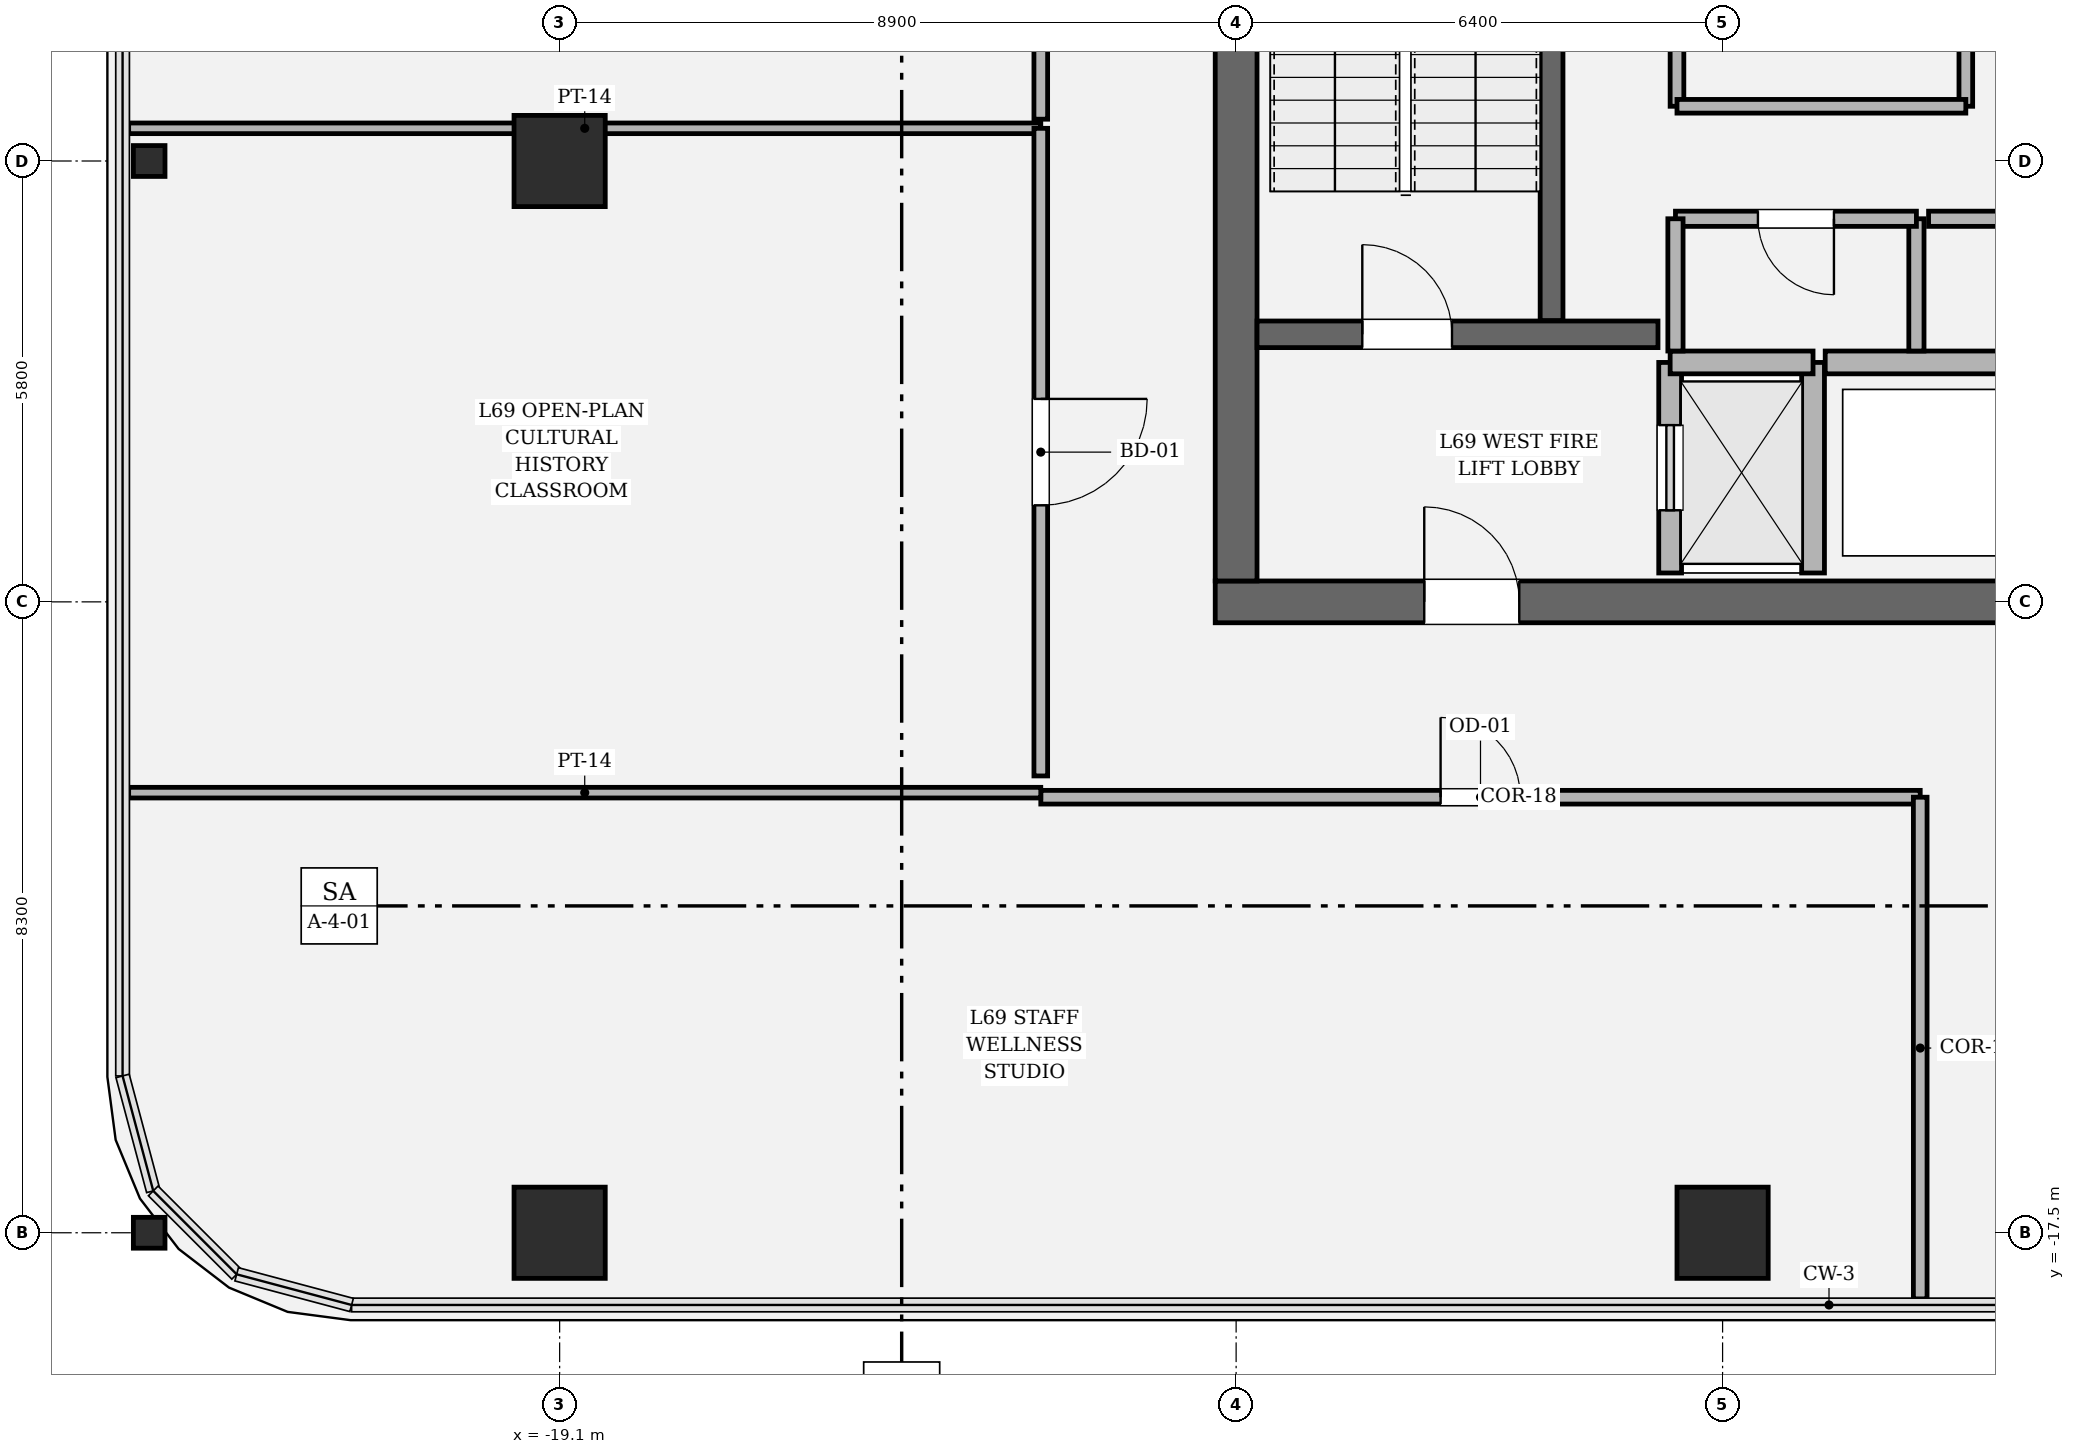
"""IFC4 building model, lengths in metres.
Left out: names, types, materials, properties, quantities, classifications, styles, units other than length and angle.
Written with IfcOpenShell. Run it as: python <this file> out.ifc"""

import sys

from ifc_helpers import new_model, si_unit, direction, frame, frame_2d, origin, origin_2d, place, context, subcontext, project, spatial, rectangle, hollow_rectangle, i_section, extrude, element, fill, save


model = new_model("IFC4")
c1 = context("Model", 3, precision=1e-05, world=origin(), true_north=direction((0.0, 1.0)))
c2 = subcontext(c1, "Body", "Model", "MODEL_VIEW")
j1 = project(units=[si_unit("LENGTHUNIT", "METRE"), si_unit("PLANEANGLEUNIT", "RADIAN")], contexts=[c1])
p1 = place(None, origin())
s1 = spatial("IfcSite", under=j1, at=p1, CompositionType="ELEMENT")
p2 = place(p1, origin())
s2 = spatial("IfcBuilding", under=s1, at=p2, CompositionType="ELEMENT")
p3 = place(p2, frame((0.0, 0.0, 292.2)))
s3 = spatial("IfcBuildingStorey", under=s2, at=p3, CompositionType="ELEMENT", Elevation=292.2)
p4 = place(p3, frame((10.475, -9.2, 0.0), z_axis=(0.0, 0.0, 1.0), x_axis=(-1.0, 0.0, 0.0)))
e1 = element("IfcWall", 1, at=p4, inside=s3, PredefinedType="SHEAR", context=c2, shape_type="SweptSolid", body=[
    extrude(rectangle(XDim=20.95, YDim=0.55, at=frame_2d((10.475, 0.0))), origin(), (0.0, 0.0, 1.0), 4.2),
])
p5 = place(p4, frame((2.75, 0.0, 0.0)))
e2 = element("IfcOpeningElement", 2, at=p5, cuts=e1, PredefinedType="OPENING", context=c2, shape_type="SweptSolid", body=[
    extrude(rectangle(XDim=1.25, YDim=2.25, at=frame_2d((0.625, 1.125))), frame((0.0, 0.285, 0.0), z_axis=(0.0, -1.0, 0.0), x_axis=(1.0, 0.0, 0.0)), (0.0, 0.0, 1.0), 0.57),
])
p6 = place(p4, frame((16.95, 0.0, 0.0)))
e3 = element("IfcOpeningElement", 3, at=p6, cuts=e1, PredefinedType="OPENING", context=c2, shape_type="SweptSolid", body=[
    extrude(rectangle(XDim=1.25, YDim=2.25, at=frame_2d((0.625, 1.125))), frame((0.0, 0.285, 0.0), z_axis=(0.0, -1.0, 0.0), x_axis=(1.0, 0.0, 0.0)), (0.0, 0.0, 1.0), 0.57),
])
p7 = place(p3, frame((-10.2, -8.925, 0.0), z_axis=(0.0, 0.0, 1.0), x_axis=(0.0, 1.0, 0.0)))
e4 = element("IfcWall", 4, at=p7, inside=s3, PredefinedType="SHEAR", context=c2, shape_type="SweptSolid", body=[
    extrude(rectangle(XDim=17.85, YDim=0.55, at=frame_2d((8.925, 0.0))), origin(), (0.0, 0.0, 1.0), 4.2),
])
p8 = place(p7, frame((12.715, 0.0, 0.0)))
e5 = element("IfcOpeningElement", 5, at=p8, cuts=e4, PredefinedType="OPENING", context=c2, shape_type="SweptSolid", body=[
    extrude(rectangle(XDim=1.18, YDim=2.2, at=frame_2d((0.59, 1.1))), frame((0.0, 0.285, 0.0), z_axis=(0.0, -1.0, 0.0), x_axis=(1.0, 0.0, 0.0)), (0.0, 0.0, 1.0), 0.57),
])
p9 = place(p3, frame((-6.05, -5.5, 0.0), z_axis=(0.0, 0.0, 1.0), x_axis=(0.0, 1.0, 0.0)))
e6 = element("IfcWall", 6, at=p9, inside=s3, PredefinedType="SOLIDWALL", context=c2, shape_type="SweptSolid", body=[
    extrude(rectangle(XDim=8.95, YDim=0.3, at=frame_2d((4.475, 0.0))), origin(), (0.0, 0.0, 1.0), 4.2),
])
p10 = place(p3, frame((-9.925, -5.68, 0.0), z_axis=(0.0, 0.0, 1.0), x_axis=(1.0, 0.0, 0.0)))
e7 = element("IfcWall", 7, at=p10, inside=s3, PredefinedType="SOLIDWALL", context=c2, shape_type="SweptSolid", body=[
    extrude(rectangle(XDim=5.275, YDim=0.35, at=frame_2d((2.638, 0.0))), origin(), (0.0, 0.0, 1.0), 4.2),
])
p11 = place(p10, frame((1.385, 0.0, 0.0)))
e8 = element("IfcOpeningElement", 8, at=p11, cuts=e7, PredefinedType="OPENING", context=c2, shape_type="SweptSolid", body=[
    extrude(rectangle(XDim=1.18, YDim=2.2, at=frame_2d((0.59, 1.1))), frame((0.0, 0.185, 0.0), z_axis=(0.0, -1.0, 0.0), x_axis=(1.0, 0.0, 0.0)), (0.0, 0.0, 1.0), 0.37),
])
for number, where, z_axis, x_axis in (
    (9, (-19.1, -17.5, 0.0), (0.0, 0.0, 1.0), (1.0, 0.0, 0.0)),
    (10, (-3.8, -17.5, 0.0), (0.0, 0.0, 1.0), (1.0, 0.0, 0.0)),
    (11, (-19.1, -3.4, 0.0), (0.0, 0.0, 1.0), (1.0, 0.0, 0.0)),
):
    element("IfcColumn", number, at=place(p3, frame(where, z_axis=z_axis, x_axis=x_axis)), inside=s3, PredefinedType="COLUMN", context=c2, shape_type="SweptSolid", body=[
        extrude(hollow_rectangle(XDim=1.2, YDim=1.2, WallThickness=0.035, at=origin_2d()), origin(), (0.0, 0.0, 1.0), 4.2),
    ])
for number, where, z_axis, x_axis in (
    (12, (-24.5, -17.5, 0.0), (0.0, 0.0, 1.0), (0.0, 1.0, 0.0)),
    (13, (-24.5, -3.4, 0.0), (0.0, 0.0, 1.0), (0.0, 1.0, 0.0)),
):
    element("IfcColumn", number, at=place(p3, frame(where, z_axis=z_axis, x_axis=x_axis)), inside=s3, PredefinedType="COLUMN", context=c2, shape_type="SweptSolid", body=[
        extrude(i_section(OverallWidth=0.406, OverallDepth=0.416, WebThickness=0.029, FlangeThickness=0.048, FilletRadius=0.018, at=origin_2d()), origin(), (0.0, 0.0, 1.0), 4.198),
    ])
p12 = place(p3, frame((-4.49, -8.82, 0.0), z_axis=(0.0, 0.0, 1.0), x_axis=(0.0, 1.0, 0.0)))
e14 = element("IfcWall", 14, at=p12, inside=s3, PredefinedType="SOLIDWALL", context=c2, shape_type="SweptSolid", body=[
    extrude(rectangle(XDim=2.77, YDim=0.3, at=frame_2d((1.385, 0.0))), origin(), (0.0, 0.0, 1.0), 4.0),
])
p13 = place(p12, frame((0.825, 0.0, 0.0)))
e15 = element("IfcOpeningElement", 15, at=p13, cuts=e14, PredefinedType="OPENING", context=c2, shape_type="SweptSolid", body=[
    extrude(rectangle(XDim=1.12, YDim=2.25, at=frame_2d((0.56, 1.125))), frame((0.0, 0.16, 0.0), z_axis=(0.0, -1.0, 0.0), x_axis=(1.0, 0.0, 0.0)), (0.0, 0.0, 1.0), 0.32),
])
p14 = place(p3, frame((-2.61, -8.82, 0.0), z_axis=(0.0, 0.0, 1.0), x_axis=(0.0, 1.0, 0.0)))
e16 = element("IfcWall", 16, at=p14, inside=s3, PredefinedType="SOLIDWALL", context=c2, shape_type="SweptSolid", body=[
    extrude(rectangle(XDim=2.77, YDim=0.3, at=frame_2d((1.385, 0.0))), origin(), (0.0, 0.0, 1.0), 4.0),
])
p15 = place(p3, frame((-4.49, -6.05, 0.0), z_axis=(0.0, 0.0, 1.0), x_axis=(1.0, 0.0, 0.0)))
e17 = element("IfcWall", 17, at=p15, inside=s3, PredefinedType="SOLIDWALL", context=c2, shape_type="SweptSolid", body=[
    extrude(rectangle(XDim=1.88, YDim=0.3, at=frame_2d((0.94, 0.0))), origin(), (0.0, 0.0, 1.0), 4.0),
])
p16 = place(p3, frame((-2.45, -6.05, 0.0), z_axis=(0.0, 0.0, 1.0), x_axis=(1.0, 0.0, 0.0)))
e18 = element("IfcWall", 18, at=p16, inside=s3, PredefinedType="SOLIDWALL", context=c2, shape_type="SweptSolid", body=[
    extrude(rectangle(XDim=4.9, YDim=0.3, at=frame_2d((2.45, 0.0))), origin(), (0.0, 0.0, 1.0), 4.0),
])
p17 = place(p3, frame((-1.25, -5.9, 0.0), z_axis=(0.0, 0.0, 1.0), x_axis=(0.0, 1.0, 0.0)))
e19 = element("IfcWall", 19, at=p17, inside=s3, PredefinedType="SOLIDWALL", context=c2, shape_type="SweptSolid", body=[
    extrude(rectangle(XDim=1.74, YDim=0.2, at=frame_2d((0.87, 0.0))), origin(), (0.0, 0.0, 1.0), 4.0),
])
p18 = place(p3, frame((-1.25, -4.16, 0.0), z_axis=(0.0, 0.0, 1.0), x_axis=(-1.0, 0.0, 0.0)))
e20 = element("IfcWall", 20, at=p18, inside=s3, PredefinedType="SOLIDWALL", context=c2, shape_type="SweptSolid", body=[
    extrude(rectangle(XDim=3.17, YDim=0.2, at=frame_2d((1.585, 0.0))), origin(), (0.0, 0.0, 1.0), 4.0),
])
p19 = place(p18, frame((1.085, 0.0, 0.0)))
e21 = element("IfcOpeningElement", 21, at=p19, cuts=e20, PredefinedType="OPENING", context=c2, shape_type="SweptSolid", body=[
    extrude(rectangle(XDim=1.0, YDim=2.15, at=frame_2d((0.5, 1.075))), frame((0.0, 0.11, 0.0), z_axis=(0.0, -1.0, 0.0), x_axis=(1.0, 0.0, 0.0)), (0.0, 0.0, 1.0), 0.22),
])
p20 = place(p3, frame((-4.42, -4.16, 0.0), z_axis=(0.0, 0.0, 1.0), x_axis=(0.0, -1.0, 0.0)))
e22 = element("IfcWall", 22, at=p20, inside=s3, PredefinedType="SOLIDWALL", context=c2, shape_type="SweptSolid", body=[
    extrude(rectangle(XDim=1.74, YDim=0.2, at=frame_2d((0.87, 0.0))), origin(), (0.0, 0.0, 1.0), 4.0),
])
p21 = place(p3, frame((2.08, -4.16, 0.0), z_axis=(0.0, 0.0, 1.0), x_axis=(-1.0, 0.0, 0.0)))
e23 = element("IfcWall", 23, at=p21, inside=s3, PredefinedType="SOLIDWALL", context=c2, shape_type="SweptSolid", body=[
    extrude(rectangle(XDim=3.17, YDim=0.2, at=frame_2d((1.585, 0.0))), origin(), (0.0, 0.0, 1.0), 4.0),
])
p22 = place(p21, frame((1.11, 0.0, 0.0)))
e24 = element("IfcOpeningElement", 24, at=p22, cuts=e23, PredefinedType="OPENING", context=c2, shape_type="SweptSolid", body=[
    extrude(rectangle(XDim=0.95, YDim=2.15, at=frame_2d((0.475, 1.075))), frame((0.0, 0.11, 0.0), z_axis=(0.0, -1.0, 0.0), x_axis=(1.0, 0.0, 0.0)), (0.0, 0.0, 1.0), 0.22),
])
for number, where, z_axis, x_axis in (
    (25, (-0.6, -2.68, 0.0), (0.0, 0.0, 1.0), (0.0, 1.0, 0.0)),
    (26, (-4.4, -0.92, 0.0), (0.0, 0.0, 1.0), (0.0, -1.0, 0.0)),
):
    element("IfcWall", number, at=place(p3, frame(where, z_axis=z_axis, x_axis=x_axis)), inside=s3, PredefinedType="PARTITIONING", context=c2, shape_type="SweptSolid", body=[
        extrude(rectangle(XDim=1.76, YDim=0.18, at=frame_2d((0.88, 0.0))), origin(), (0.0, 0.0, 1.0), 4.0),
    ])
p23 = place(p3, frame((-4.4, -2.68, 0.0), z_axis=(0.0, 0.0, 1.0), x_axis=(1.0, 0.0, 0.0)))
e27 = element("IfcWall", 27, at=p23, inside=s3, PredefinedType="PARTITIONING", context=c2, shape_type="SweptSolid", body=[
    extrude(rectangle(XDim=3.8, YDim=0.18, at=frame_2d((1.9, 0.0))), origin(), (0.0, 0.0, 1.0), 4.0),
])
p24 = place(p3, frame((-12.77, -11.77, 0.0), z_axis=(0.0, 0.0, 1.0), x_axis=(1.0, 0.0, 0.0)))
e28 = element("IfcWall", 28, at=p24, inside=s3, PredefinedType="PARTITIONING", context=c2, shape_type="SweptSolid", body=[
    extrude(rectangle(XDim=11.57, YDim=0.18, at=frame_2d((5.785, 0.0))), origin(), (0.0, 0.0, 1.0), 3.394),
])
p25 = place(p24, frame((5.26, 0.0, 0.0)))
e29 = element("IfcOpeningElement", 29, at=p25, cuts=e28, PredefinedType="OPENING", context=c2, shape_type="SweptSolid", body=[
    extrude(rectangle(XDim=1.05, YDim=2.2, at=frame_2d((0.525, 1.1))), frame((0.0, 0.1, 0.0), z_axis=(0.0, -1.0, 0.0), x_axis=(1.0, 0.0, 0.0)), (0.0, 0.0, 1.0), 0.2),
])
p26 = place(p3, frame((-1.2, -11.77, 0.0), z_axis=(0.0, 0.0, 1.0), x_axis=(0.0, -1.0, 0.0)))
e30 = element("IfcWall", 30, at=p26, inside=s3, PredefinedType="PARTITIONING", context=c2, shape_type="SweptSolid", body=[
    extrude(rectangle(XDim=6.6, YDim=0.18, at=frame_2d((3.3, 0.0))), origin(), (0.0, 0.0, 1.0), 3.394),
])
for number, where, z_axis, x_axis in (
    (31, (-24.77, -11.71, 0.0), (0.0, 0.0, 1.0), (1.0, 0.0, 0.0)),
    (32, (-24.77, -2.97, 0.0), (0.0, 0.0, 1.0), (1.0, 0.0, 0.0)),
):
    element("IfcWall", number, at=place(p3, frame(where, z_axis=z_axis, x_axis=x_axis)), inside=s3, PredefinedType="PARTITIONING", context=c2, shape_type="SweptSolid", body=[
        extrude(rectangle(XDim=12.0, YDim=0.14, at=frame_2d((6.0, 0.0))), origin(), (0.0, 0.0, 1.0), 2.714),
    ])
p27 = place(p3, frame((-12.77, -2.97, 0.0), z_axis=(0.0, 0.0, 1.0), x_axis=(0.0, -1.0, 0.0)))
e33 = element("IfcWall", 33, at=p27, inside=s3, PredefinedType="PARTITIONING", context=c2, shape_type="SweptSolid", body=[
    extrude(rectangle(XDim=8.52, YDim=0.18, at=frame_2d((4.26, 0.0))), origin(), (0.0, 0.0, 1.0), 3.394),
])
p28 = place(p27, frame((3.56, 0.0, 0.0)))
e34 = element("IfcOpeningElement", 34, at=p28, cuts=e33, PredefinedType="OPENING", context=c2, shape_type="SweptSolid", body=[
    extrude(rectangle(XDim=1.4, YDim=2.25, at=frame_2d((0.7, 1.125))), frame((0.0, 0.1, 0.0), z_axis=(0.0, -1.0, 0.0), x_axis=(1.0, 0.0, 0.0)), (0.0, 0.0, 1.0), 0.2),
])
p29 = place(p3, frame((-12.77, 5.13, 0.0), z_axis=(0.0, 0.0, 1.0), x_axis=(0.0, -1.0, 0.0)))
e35 = element("IfcWall", 35, at=p29, inside=s3, PredefinedType="PARTITIONING", context=c2, shape_type="SweptSolid", body=[
    extrude(rectangle(XDim=7.98, YDim=0.18, at=frame_2d((3.99, 0.0))), origin(), (0.0, 0.0, 1.0), 3.394),
])
p30 = place(p29, frame((3.465, 0.0, 0.0)))
e36 = element("IfcOpeningElement", 36, at=p30, cuts=e35, PredefinedType="OPENING", context=c2, shape_type="SweptSolid", body=[
    extrude(rectangle(XDim=1.05, YDim=2.2, at=frame_2d((0.525, 1.1))), frame((0.0, 0.1, 0.0), z_axis=(0.0, -1.0, 0.0), x_axis=(1.0, 0.0, 0.0)), (0.0, 0.0, 1.0), 0.2),
])
p31 = place(p11, origin())
e37 = element("IfcDoor", 37, at=p31, inside=s3, OperationType="SINGLE_SWING_LEFT", PredefinedType="DOOR", context=c2, shape_type="SweptSolid", body=[
    extrude(rectangle(XDim=1.18, YDim=2.2, at=frame_2d((0.59, 1.1))), frame((0.0, 0.025, 0.0), z_axis=(0.0, -1.0, 0.0), x_axis=(1.0, 0.0, 0.0)), (0.0, 0.0, 1.0), 0.05),
])
fill(e8, e37)
p32 = place(p6, origin())
e38 = element("IfcDoor", 38, at=p32, inside=s3, OperationType="SINGLE_SWING_RIGHT", PredefinedType="DOOR", context=c2, shape_type="SweptSolid", body=[
    extrude(rectangle(XDim=1.25, YDim=2.25, at=frame_2d((0.625, 1.125))), frame((0.0, 0.025, 0.0), z_axis=(0.0, -1.0, 0.0), x_axis=(1.0, 0.0, 0.0)), (0.0, 0.0, 1.0), 0.05),
])
fill(e3, e38)
p33 = place(p13, origin())
e39 = element("IfcDoor", 39, at=p33, inside=s3, OperationType="SLIDING_TO_LEFT", PredefinedType="DOOR", context=c2, shape_type="SweptSolid", body=[
    extrude(rectangle(XDim=1.12, YDim=2.25, at=frame_2d((0.56, 1.125))), frame((0.0, 0.025, 0.0), z_axis=(0.0, -1.0, 0.0), x_axis=(1.0, 0.0, 0.0)), (0.0, 0.0, 1.0), 0.05),
])
fill(e15, e39)
p34 = place(p19, origin())
e40 = element("IfcDoor", 40, at=p34, inside=s3, OperationType="SINGLE_SWING_LEFT", PredefinedType="DOOR", context=c2, shape_type="SweptSolid", body=[
    extrude(rectangle(XDim=1.0, YDim=2.15, at=frame_2d((0.5, 1.075))), frame((0.0, 0.025, 0.0), z_axis=(0.0, -1.0, 0.0), x_axis=(1.0, 0.0, 0.0)), (0.0, 0.0, 1.0), 0.05),
])
fill(e21, e40)
p35 = place(p25, origin())
e41 = element("IfcDoor", 41, at=p35, inside=s3, OperationType="SINGLE_SWING_LEFT", PredefinedType="DOOR", context=c2, shape_type="SweptSolid", body=[
    extrude(rectangle(XDim=1.05, YDim=2.2, at=frame_2d((0.525, 1.1))), frame((0.0, 0.025, 0.0), z_axis=(0.0, -1.0, 0.0), x_axis=(1.0, 0.0, 0.0)), (0.0, 0.0, 1.0), 0.05),
])
fill(e29, e41)
p36 = place(p28, origin())
e42 = element("IfcDoor", 42, at=p36, inside=s3, OperationType="SINGLE_SWING_LEFT", PredefinedType="DOOR", context=c2, shape_type="SweptSolid", body=[
    extrude(rectangle(XDim=1.4, YDim=2.25, at=frame_2d((0.7, 1.125))), frame((0.0, 0.025, 0.0), z_axis=(0.0, -1.0, 0.0), x_axis=(1.0, 0.0, 0.0)), (0.0, 0.0, 1.0), 0.05),
])
fill(e34, e42)
save(model, sys.argv[1])
